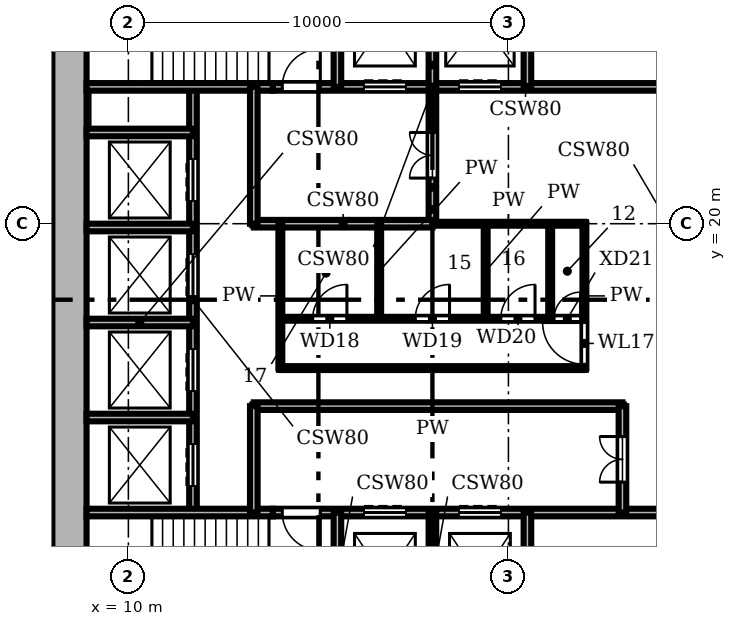
"""IFC4 building model, lengths in metres.
Left out: names, types, materials, properties, quantities, classifications, styles, units other than length and angle.
Written with IfcOpenShell. Run it as: python <this file> out.ifc"""

import sys

from ifc_helpers import new_model, si_unit, direction, frame, frame_2d, origin, place, context, subcontext, project, spatial, rectangle, extrude, element, fill, save


model = new_model("IFC4")
c1 = context("Model", 3, precision=1e-05, world=origin(), true_north=direction((0.0, 1.0)))
c2 = subcontext(c1, "Body", "Model", "MODEL_VIEW")
j1 = project(units=[si_unit("LENGTHUNIT", "METRE"), si_unit("PLANEANGLEUNIT", "RADIAN")], contexts=[c1])
p1 = place(None, origin())
s1 = spatial("IfcSite", under=j1, at=p1, CompositionType="ELEMENT")
p2 = place(p1, origin())
s2 = spatial("IfcBuilding", under=s1, at=p2, CompositionType="ELEMENT")
p3 = place(p2, frame((0.0, 0.0, 12.0)))
s3 = spatial("IfcBuildingStorey", under=s2, at=p3, CompositionType="ELEMENT", Elevation=12.0)
p4 = place(p3, frame((8.45, 27.1, 0.0), z_axis=(0.0, 0.0, 1.0), x_axis=(0.0, -1.0, 0.0)))
e1 = element("IfcWall", 1, at=p4, inside=s3, PredefinedType="SHEAR", context=c2, shape_type="SweptSolid", body=[
    extrude(rectangle(XDim=18.2, YDim=0.9, at=frame_2d((9.1, 0.0))), origin(), (0.0, 0.0, 1.0), 3.9),
])
p5 = place(p3, frame((8.9, 12.4, 0.0), z_axis=(0.0, 0.0, 1.0), x_axis=(1.0, 0.0, 0.0)))
e2 = element("IfcWall", 2, at=p5, inside=s3, PredefinedType="SHEAR", context=c2, shape_type="SweptSolid", body=[
    extrude(rectangle(XDim=4.9, YDim=0.2, at=frame_2d((2.45, 0.0))), origin(), (0.0, 0.0, 1.0), 3.58),
])
p6 = place(p3, frame((13.8, 12.4, 0.0), z_axis=(0.0, 0.0, 1.0), x_axis=(1.0, 0.0, 0.0)))
e3 = element("IfcWall", 3, at=p6, inside=s3, PredefinedType="SHEAR", context=c2, shape_type="SweptSolid", body=[
    extrude(rectangle(XDim=13.3, YDim=0.2, at=frame_2d((6.65, 0.0))), origin(), (0.0, 0.0, 1.0), 3.58),
])
p7 = place(p6, frame((2.4, 0.0, 0.0)))
e4 = element("IfcOpeningElement", 4, at=p7, cuts=e3, PredefinedType="OPENING", context=c2, shape_type="SweptSolid", body=[
    extrude(rectangle(XDim=1.1, YDim=2.1, at=frame_2d((0.55, 1.05))), frame((0.0, 0.11, 0.0), z_axis=(0.0, -1.0, 0.0), x_axis=(1.0, 0.0, 0.0)), (0.0, 0.0, 1.0), 0.22),
])
p8 = place(p6, frame((4.9, 0.0, 0.0)))
e5 = element("IfcOpeningElement", 5, at=p8, cuts=e3, PredefinedType="OPENING", context=c2, shape_type="SweptSolid", body=[
    extrude(rectangle(XDim=1.1, YDim=2.1, at=frame_2d((0.55, 1.05))), frame((0.0, 0.11, 0.0), z_axis=(0.0, -1.0, 0.0), x_axis=(1.0, 0.0, 0.0)), (0.0, 0.0, 1.0), 0.22),
])
p9 = place(p6, frame((0.25, 0.0, 0.0)))
e6 = element("IfcOpeningElement", 6, at=p9, cuts=e3, PredefinedType="OPENING", context=c2, shape_type="SweptSolid", body=[
    extrude(rectangle(XDim=1.0, YDim=2.1, at=frame_2d((0.5, 1.05))), frame((0.0, 0.11, 0.0), z_axis=(0.0, -1.0, 0.0), x_axis=(1.0, 0.0, 0.0)), (0.0, 0.0, 1.0), 0.22),
])
p10 = place(p3, frame((8.9, 14.9, 0.0), z_axis=(0.0, 0.0, 1.0), x_axis=(1.0, 0.0, 0.0)))
e7 = element("IfcWall", 7, at=p10, inside=s3, PredefinedType="SHEAR", context=c2, shape_type="SweptSolid", body=[
    extrude(rectangle(XDim=2.8, YDim=0.2, at=frame_2d((1.4, 0.0))), origin(), (0.0, 0.0, 1.0), 3.58),
])
p11 = place(p3, frame((13.3, 15.2, 0.0), z_axis=(0.0, 0.0, 1.0), x_axis=(1.0, 0.0, 0.0)))
e8 = element("IfcWall", 8, at=p11, inside=s3, PredefinedType="SHEAR", context=c2, shape_type="SweptSolid", body=[
    extrude(rectangle(XDim=9.7, YDim=0.2, at=frame_2d((4.85, 0.0))), origin(), (0.0, 0.0, 1.0), 3.58),
])
p12 = place(p3, frame((14.0, 16.2, 0.0), z_axis=(0.0, 0.0, 1.0), x_axis=(1.0, 0.0, 0.0)))
e9 = element("IfcWall", 9, at=p12, inside=s3, PredefinedType="PARTITIONING", context=c2, shape_type="SweptSolid", body=[
    extrude(rectangle(XDim=8.0, YDim=0.1, at=frame_2d((4.0, 0.0))), origin(), (0.0, 0.0, 1.0), 3.58),
])
p13 = place(p3, frame((8.9, 17.4, 0.0), z_axis=(0.0, 0.0, 1.0), x_axis=(1.0, 0.0, 0.0)))
e10 = element("IfcWall", 10, at=p13, inside=s3, PredefinedType="SHEAR", context=c2, shape_type="SweptSolid", body=[
    extrude(rectangle(XDim=2.8, YDim=0.2, at=frame_2d((1.4, 0.0))), origin(), (0.0, 0.0, 1.0), 3.58),
])
p14 = place(p3, frame((14.0, 17.5, 0.0), z_axis=(0.0, 0.0, 1.0), x_axis=(1.0, 0.0, 0.0)))
e11 = element("IfcWall", 11, at=p14, inside=s3, PredefinedType="PARTITIONING", context=c2, shape_type="SweptSolid", body=[
    extrude(rectangle(XDim=8.0, YDim=0.1, at=frame_2d((4.0, 0.0))), origin(), (0.0, 0.0, 1.0), 3.58),
])
p15 = place(p14, frame((0.85, 0.0, 0.0)))
e12 = element("IfcOpeningElement", 12, at=p15, cuts=e11, PredefinedType="OPENING", context=c2, shape_type="SweptSolid", body=[
    extrude(rectangle(XDim=0.9, YDim=2.1, at=frame_2d((0.45, 1.05))), frame((0.0, 0.06, 0.0), z_axis=(0.0, -1.0, 0.0), x_axis=(1.0, 0.0, 0.0)), (0.0, 0.0, 1.0), 0.12),
])
p16 = place(p14, frame((3.55, 0.0, 0.0)))
e13 = element("IfcOpeningElement", 13, at=p16, cuts=e11, PredefinedType="OPENING", context=c2, shape_type="SweptSolid", body=[
    extrude(rectangle(XDim=0.9, YDim=2.1, at=frame_2d((0.45, 1.05))), frame((0.0, 0.06, 0.0), z_axis=(0.0, -1.0, 0.0), x_axis=(1.0, 0.0, 0.0)), (0.0, 0.0, 1.0), 0.12),
])
p17 = place(p14, frame((5.8, 0.0, 0.0)))
e14 = element("IfcOpeningElement", 14, at=p17, cuts=e11, PredefinedType="OPENING", context=c2, shape_type="SweptSolid", body=[
    extrude(rectangle(XDim=0.9, YDim=2.1, at=frame_2d((0.45, 1.05))), frame((0.0, 0.06, 0.0), z_axis=(0.0, -1.0, 0.0), x_axis=(1.0, 0.0, 0.0)), (0.0, 0.0, 1.0), 0.12),
])
p18 = place(p14, frame((7.2, 0.0, 0.0)))
e15 = element("IfcOpeningElement", 15, at=p18, cuts=e11, PredefinedType="OPENING", context=c2, shape_type="SweptSolid", body=[
    extrude(rectangle(XDim=0.7, YDim=2.1, at=frame_2d((0.35, 1.05))), frame((0.0, 0.06, 0.0), z_axis=(0.0, -1.0, 0.0), x_axis=(1.0, 0.0, 0.0)), (0.0, 0.0, 1.0), 0.12),
])
p19 = place(p3, frame((8.9, 19.9, 0.0), z_axis=(0.0, 0.0, 1.0), x_axis=(1.0, 0.0, 0.0)))
e16 = element("IfcWall", 16, at=p19, inside=s3, PredefinedType="SHEAR", context=c2, shape_type="SweptSolid", body=[
    extrude(rectangle(XDim=2.8, YDim=0.2, at=frame_2d((1.4, 0.0))), origin(), (0.0, 0.0, 1.0), 3.58),
])
p20 = place(p3, frame((18.0, 20.0, 0.0), z_axis=(0.0, 0.0, 1.0), x_axis=(1.0, 0.0, 0.0)))
e17 = element("IfcWall", 17, at=p20, inside=s3, PredefinedType="PARTITIONING", context=c2, shape_type="SweptSolid", body=[
    extrude(rectangle(XDim=4.0, YDim=0.1, at=frame_2d((2.0, 0.0))), origin(), (0.0, 0.0, 1.0), 3.58),
])
p21 = place(p3, frame((13.3, 20.0, 0.0), z_axis=(0.0, 0.0, 1.0), x_axis=(1.0, 0.0, 0.0)))
e18 = element("IfcWall", 18, at=p21, inside=s3, PredefinedType="SHEAR", context=c2, shape_type="SweptSolid", body=[
    extrude(rectangle(XDim=4.7, YDim=0.2, at=frame_2d((2.35, 0.0))), origin(), (0.0, 0.0, 1.0), 3.58),
])
p22 = place(p3, frame((8.9, 22.4, 0.0), z_axis=(0.0, 0.0, 1.0), x_axis=(1.0, 0.0, 0.0)))
e19 = element("IfcWall", 19, at=p22, inside=s3, PredefinedType="SHEAR", context=c2, shape_type="SweptSolid", body=[
    extrude(rectangle(XDim=2.8, YDim=0.2, at=frame_2d((1.4, 0.0))), origin(), (0.0, 0.0, 1.0), 3.58),
])
p23 = place(p3, frame((8.9, 23.6, 0.0), z_axis=(0.0, 0.0, 1.0), x_axis=(1.0, 0.0, 0.0)))
e20 = element("IfcWall", 20, at=p23, inside=s3, PredefinedType="SHEAR", context=c2, shape_type="SweptSolid", body=[
    extrude(rectangle(XDim=4.9, YDim=0.2, at=frame_2d((2.45, 0.0))), origin(), (0.0, 0.0, 1.0), 3.58),
])
p24 = place(p3, frame((13.8, 23.6, 0.0), z_axis=(0.0, 0.0, 1.0), x_axis=(1.0, 0.0, 0.0)))
e21 = element("IfcWall", 21, at=p24, inside=s3, PredefinedType="SHEAR", context=c2, shape_type="SweptSolid", body=[
    extrude(rectangle(XDim=13.3, YDim=0.2, at=frame_2d((6.65, 0.0))), origin(), (0.0, 0.0, 1.0), 3.58),
])
p25 = place(p24, frame((2.4, 0.0, 0.0)))
e22 = element("IfcOpeningElement", 22, at=p25, cuts=e21, PredefinedType="OPENING", context=c2, shape_type="SweptSolid", body=[
    extrude(rectangle(XDim=1.1, YDim=2.1, at=frame_2d((0.55, 1.05))), frame((0.0, 0.11, 0.0), z_axis=(0.0, -1.0, 0.0), x_axis=(1.0, 0.0, 0.0)), (0.0, 0.0, 1.0), 0.22),
])
p26 = place(p24, frame((4.9, 0.0, 0.0)))
e23 = element("IfcOpeningElement", 23, at=p26, cuts=e21, PredefinedType="OPENING", context=c2, shape_type="SweptSolid", body=[
    extrude(rectangle(XDim=1.1, YDim=2.1, at=frame_2d((0.55, 1.05))), frame((0.0, 0.11, 0.0), z_axis=(0.0, -1.0, 0.0), x_axis=(1.0, 0.0, 0.0)), (0.0, 0.0, 1.0), 0.22),
])
p27 = place(p24, frame((0.25, 0.0, 0.0)))
e24 = element("IfcOpeningElement", 24, at=p27, cuts=e21, PredefinedType="OPENING", context=c2, shape_type="SweptSolid", body=[
    extrude(rectangle(XDim=1.0, YDim=2.1, at=frame_2d((0.5, 1.05))), frame((0.0, 0.11, 0.0), z_axis=(0.0, -1.0, 0.0), x_axis=(1.0, 0.0, 0.0)), (0.0, 0.0, 1.0), 0.22),
])
p28 = place(p3, frame((11.7, 12.4, 0.0), z_axis=(0.0, 0.0, 1.0), x_axis=(0.0, 1.0, 0.0)))
e25 = element("IfcWall", 25, at=p28, inside=s3, PredefinedType="SHEAR", context=c2, shape_type="SweptSolid", body=[
    extrude(rectangle(XDim=11.2, YDim=0.2, at=frame_2d((5.6, 0.0))), origin(), (0.0, 0.0, 1.0), 3.58),
])
p29 = place(p28, frame((0.7, 0.0, 0.0)))
e26 = element("IfcOpeningElement", 26, at=p29, cuts=e25, PredefinedType="OPENING", context=c2, shape_type="SweptSolid", body=[
    extrude(rectangle(XDim=1.1, YDim=2.1, at=frame_2d((0.55, 1.05))), frame((0.0, 0.11, 0.0), z_axis=(0.0, -1.0, 0.0), x_axis=(1.0, 0.0, 0.0)), (0.0, 0.0, 1.0), 0.22),
])
p30 = place(p28, frame((3.2, 0.0, 0.0)))
e27 = element("IfcOpeningElement", 27, at=p30, cuts=e25, PredefinedType="OPENING", context=c2, shape_type="SweptSolid", body=[
    extrude(rectangle(XDim=1.1, YDim=2.1, at=frame_2d((0.55, 1.05))), frame((0.0, 0.11, 0.0), z_axis=(0.0, -1.0, 0.0), x_axis=(1.0, 0.0, 0.0)), (0.0, 0.0, 1.0), 0.22),
])
p31 = place(p28, frame((5.7, 0.0, 0.0)))
e28 = element("IfcOpeningElement", 28, at=p31, cuts=e25, PredefinedType="OPENING", context=c2, shape_type="SweptSolid", body=[
    extrude(rectangle(XDim=1.1, YDim=2.1, at=frame_2d((0.55, 1.05))), frame((0.0, 0.11, 0.0), z_axis=(0.0, -1.0, 0.0), x_axis=(1.0, 0.0, 0.0)), (0.0, 0.0, 1.0), 0.22),
])
p32 = place(p28, frame((8.2, 0.0, 0.0)))
e29 = element("IfcOpeningElement", 29, at=p32, cuts=e25, PredefinedType="OPENING", context=c2, shape_type="SweptSolid", body=[
    extrude(rectangle(XDim=1.1, YDim=2.1, at=frame_2d((0.55, 1.05))), frame((0.0, 0.11, 0.0), z_axis=(0.0, -1.0, 0.0), x_axis=(1.0, 0.0, 0.0)), (0.0, 0.0, 1.0), 0.22),
])
p33 = place(p3, frame((13.3, 12.4, 0.0), z_axis=(0.0, 0.0, 1.0), x_axis=(0.0, 1.0, 0.0)))
e30 = element("IfcWall", 30, at=p33, inside=s3, PredefinedType="SHEAR", context=c2, shape_type="SweptSolid", body=[
    extrude(rectangle(XDim=2.8, YDim=0.2, at=frame_2d((1.4, 0.0))), origin(), (0.0, 0.0, 1.0), 3.58),
])
p34 = place(p3, frame((13.3, 20.0, 0.0), z_axis=(0.0, 0.0, 1.0), x_axis=(0.0, 1.0, 0.0)))
e31 = element("IfcWall", 31, at=p34, inside=s3, PredefinedType="SHEAR", context=c2, shape_type="SweptSolid", body=[
    extrude(rectangle(XDim=3.6, YDim=0.2, at=frame_2d((1.8, 0.0))), origin(), (0.0, 0.0, 1.0), 3.58),
])
p35 = place(p3, frame((14.0, 16.2, 0.0), z_axis=(0.0, 0.0, 1.0), x_axis=(0.0, 1.0, 0.0)))
e32 = element("IfcWall", 32, at=p35, inside=s3, PredefinedType="PARTITIONING", context=c2, shape_type="SweptSolid", body=[
    extrude(rectangle(XDim=3.8, YDim=0.1, at=frame_2d((1.9, 0.0))), origin(), (0.0, 0.0, 1.0), 3.58),
])
for number, where, z_axis, x_axis in (
    (33, (15.5, 8.9, 0.0), (0.0, 0.0, 1.0), (0.0, 1.0, 0.0)),
    (34, (15.5, 23.6, 0.0), (0.0, 0.0, 1.0), (0.0, 1.0, 0.0)),
):
    element("IfcWall", number, at=place(p3, frame(where, z_axis=z_axis, x_axis=x_axis)), inside=s3, PredefinedType="SHEAR", context=c2, shape_type="SweptSolid", body=[
        extrude(rectangle(XDim=3.5, YDim=0.2, at=frame_2d((1.75, 0.0))), origin(), (0.0, 0.0, 1.0), 3.58),
    ])
p36 = place(p3, frame((16.6, 17.5, 0.0), z_axis=(0.0, 0.0, 1.0), x_axis=(0.0, 1.0, 0.0)))
e35 = element("IfcWall", 35, at=p36, inside=s3, PredefinedType="PARTITIONING", context=c2, shape_type="SweptSolid", body=[
    extrude(rectangle(XDim=2.5, YDim=0.1, at=frame_2d((1.25, 0.0))), origin(), (0.0, 0.0, 1.0), 3.58),
])
p37 = place(p3, frame((18.0, 8.9, 0.0), z_axis=(0.0, 0.0, 1.0), x_axis=(0.0, 1.0, 0.0)))
e36 = element("IfcWall", 36, at=p37, inside=s3, PredefinedType="SHEAR", context=c2, shape_type="SweptSolid", body=[
    extrude(rectangle(XDim=3.5, YDim=0.2, at=frame_2d((1.75, 0.0))), origin(), (0.0, 0.0, 1.0), 3.58),
])
p38 = place(p3, frame((18.0, 20.0, 0.0), z_axis=(0.0, 0.0, 1.0), x_axis=(0.0, 1.0, 0.0)))
e37 = element("IfcWall", 37, at=p38, inside=s3, PredefinedType="SHEAR", context=c2, shape_type="SweptSolid", body=[
    extrude(rectangle(XDim=7.1, YDim=0.2, at=frame_2d((3.55, 0.0))), origin(), (0.0, 0.0, 1.0), 3.58),
])
p39 = place(p38, frame((1.2, 0.0, 0.0)))
e38 = element("IfcOpeningElement", 38, at=p39, cuts=e37, PredefinedType="OPENING", context=c2, shape_type="SweptSolid", body=[
    extrude(rectangle(XDim=1.2, YDim=2.1, at=frame_2d((0.6, 1.05))), frame((0.0, 0.11, 0.0), z_axis=(0.0, -1.0, 0.0), x_axis=(1.0, 0.0, 0.0)), (0.0, 0.0, 1.0), 0.22),
])
p40 = place(p3, frame((19.4, 17.5, 0.0), z_axis=(0.0, 0.0, 1.0), x_axis=(0.0, 1.0, 0.0)))
e39 = element("IfcWall", 39, at=p40, inside=s3, PredefinedType="PARTITIONING", context=c2, shape_type="SweptSolid", body=[
    extrude(rectangle(XDim=2.5, YDim=0.1, at=frame_2d((1.25, 0.0))), origin(), (0.0, 0.0, 1.0), 3.58),
])
for number, where, z_axis, x_axis in (
    (40, (20.5, 8.9, 0.0), (0.0, 0.0, 1.0), (0.0, 1.0, 0.0)),
    (41, (20.5, 23.6, 0.0), (0.0, 0.0, 1.0), (0.0, 1.0, 0.0)),
):
    element("IfcWall", number, at=place(p3, frame(where, z_axis=z_axis, x_axis=x_axis)), inside=s3, PredefinedType="SHEAR", context=c2, shape_type="SweptSolid", body=[
        extrude(rectangle(XDim=3.5, YDim=0.2, at=frame_2d((1.75, 0.0))), origin(), (0.0, 0.0, 1.0), 3.58),
    ])
p41 = place(p3, frame((21.1, 17.5, 0.0), z_axis=(0.0, 0.0, 1.0), x_axis=(0.0, 1.0, 0.0)))
e42 = element("IfcWall", 42, at=p41, inside=s3, PredefinedType="PARTITIONING", context=c2, shape_type="SweptSolid", body=[
    extrude(rectangle(XDim=2.5, YDim=0.1, at=frame_2d((1.25, 0.0))), origin(), (0.0, 0.0, 1.0), 3.58),
])
p42 = place(p3, frame((22.0, 16.2, 0.0), z_axis=(0.0, 0.0, 1.0), x_axis=(0.0, 1.0, 0.0)))
e43 = element("IfcWall", 43, at=p42, inside=s3, PredefinedType="PARTITIONING", context=c2, shape_type="SweptSolid", body=[
    extrude(rectangle(XDim=3.8, YDim=0.1, at=frame_2d((1.9, 0.0))), origin(), (0.0, 0.0, 1.0), 3.58),
])
p43 = place(p42, frame((0.1, 0.0, 0.0)))
e44 = element("IfcOpeningElement", 44, at=p43, cuts=e43, PredefinedType="OPENING", context=c2, shape_type="SweptSolid", body=[
    extrude(rectangle(XDim=1.1, YDim=2.1, at=frame_2d((0.55, 1.05))), frame((0.0, 0.06, 0.0), z_axis=(0.0, -1.0, 0.0), x_axis=(1.0, 0.0, 0.0)), (0.0, 0.0, 1.0), 0.12),
])
p44 = place(p3, frame((23.0, 12.4, 0.0), z_axis=(0.0, 0.0, 1.0), x_axis=(0.0, 1.0, 0.0)))
e45 = element("IfcWall", 45, at=p44, inside=s3, PredefinedType="SHEAR", context=c2, shape_type="SweptSolid", body=[
    extrude(rectangle(XDim=2.8, YDim=0.2, at=frame_2d((1.4, 0.0))), origin(), (0.0, 0.0, 1.0), 3.58),
])
p45 = place(p44, frame((0.8, 0.0, 0.0)))
e46 = element("IfcOpeningElement", 46, at=p45, cuts=e45, PredefinedType="OPENING", context=c2, shape_type="SweptSolid", body=[
    extrude(rectangle(XDim=1.2, YDim=2.1, at=frame_2d((0.6, 1.05))), frame((0.0, 0.11, 0.0), z_axis=(0.0, -1.0, 0.0), x_axis=(1.0, 0.0, 0.0)), (0.0, 0.0, 1.0), 0.22),
])
p46 = place(p29, origin())
e47 = element("IfcDoor", 47, at=p46, inside=s3, OperationType="DOUBLE_DOOR_SLIDING", PredefinedType="DOOR", context=c2, shape_type="SweptSolid", body=[
    extrude(rectangle(XDim=1.1, YDim=2.1, at=frame_2d((0.55, 1.05))), frame((0.0, 0.025, 0.0), z_axis=(0.0, -1.0, 0.0), x_axis=(1.0, 0.0, 0.0)), (0.0, 0.0, 1.0), 0.05),
])
fill(e26, e47)
p47 = place(p30, origin())
e48 = element("IfcDoor", 48, at=p47, inside=s3, OperationType="DOUBLE_DOOR_SLIDING", PredefinedType="DOOR", context=c2, shape_type="SweptSolid", body=[
    extrude(rectangle(XDim=1.1, YDim=2.1, at=frame_2d((0.55, 1.05))), frame((0.0, 0.025, 0.0), z_axis=(0.0, -1.0, 0.0), x_axis=(1.0, 0.0, 0.0)), (0.0, 0.0, 1.0), 0.05),
])
fill(e27, e48)
p48 = place(p31, origin())
e49 = element("IfcDoor", 49, at=p48, inside=s3, OperationType="DOUBLE_DOOR_SLIDING", PredefinedType="DOOR", context=c2, shape_type="SweptSolid", body=[
    extrude(rectangle(XDim=1.1, YDim=2.1, at=frame_2d((0.55, 1.05))), frame((0.0, 0.025, 0.0), z_axis=(0.0, -1.0, 0.0), x_axis=(1.0, 0.0, 0.0)), (0.0, 0.0, 1.0), 0.05),
])
fill(e28, e49)
p49 = place(p32, origin())
e50 = element("IfcDoor", 50, at=p49, inside=s3, OperationType="DOUBLE_DOOR_SLIDING", PredefinedType="DOOR", context=c2, shape_type="SweptSolid", body=[
    extrude(rectangle(XDim=1.1, YDim=2.1, at=frame_2d((0.55, 1.05))), frame((0.0, 0.025, 0.0), z_axis=(0.0, -1.0, 0.0), x_axis=(1.0, 0.0, 0.0)), (0.0, 0.0, 1.0), 0.05),
])
fill(e29, e50)
p50 = place(p7, origin())
e51 = element("IfcDoor", 51, at=p50, inside=s3, OperationType="DOUBLE_DOOR_SLIDING", PredefinedType="DOOR", context=c2, shape_type="SweptSolid", body=[
    extrude(rectangle(XDim=1.1, YDim=2.1, at=frame_2d((0.55, 1.05))), frame((0.0, 0.025, 0.0), z_axis=(0.0, -1.0, 0.0), x_axis=(1.0, 0.0, 0.0)), (0.0, 0.0, 1.0), 0.05),
])
fill(e4, e51)
p51 = place(p8, origin())
e52 = element("IfcDoor", 52, at=p51, inside=s3, OperationType="DOUBLE_DOOR_SLIDING", PredefinedType="DOOR", context=c2, shape_type="SweptSolid", body=[
    extrude(rectangle(XDim=1.1, YDim=2.1, at=frame_2d((0.55, 1.05))), frame((0.0, 0.025, 0.0), z_axis=(0.0, -1.0, 0.0), x_axis=(1.0, 0.0, 0.0)), (0.0, 0.0, 1.0), 0.05),
])
fill(e5, e52)
p52 = place(p25, origin())
e53 = element("IfcDoor", 53, at=p52, inside=s3, OperationType="DOUBLE_DOOR_SLIDING", PredefinedType="DOOR", context=c2, shape_type="SweptSolid", body=[
    extrude(rectangle(XDim=1.1, YDim=2.1, at=frame_2d((0.55, 1.05))), frame((0.0, 0.025, 0.0), z_axis=(0.0, -1.0, 0.0), x_axis=(1.0, 0.0, 0.0)), (0.0, 0.0, 1.0), 0.05),
])
fill(e22, e53)
p53 = place(p26, origin())
e54 = element("IfcDoor", 54, at=p53, inside=s3, OperationType="DOUBLE_DOOR_SLIDING", PredefinedType="DOOR", context=c2, shape_type="SweptSolid", body=[
    extrude(rectangle(XDim=1.1, YDim=2.1, at=frame_2d((0.55, 1.05))), frame((0.0, 0.025, 0.0), z_axis=(0.0, -1.0, 0.0), x_axis=(1.0, 0.0, 0.0)), (0.0, 0.0, 1.0), 0.05),
])
fill(e23, e54)
p54 = place(p9, frame((1.0, 0.0, 0.0), z_axis=(0.0, 0.0, 1.0), x_axis=(-1.0, 0.0, 0.0)))
e55 = element("IfcDoor", 55, at=p54, inside=s3, OperationType="SINGLE_SWING_LEFT", PredefinedType="DOOR", context=c2, shape_type="SweptSolid", body=[
    extrude(rectangle(XDim=1.0, YDim=2.1, at=frame_2d((0.5, 1.05))), frame((0.0, 0.025, 0.0), z_axis=(0.0, -1.0, 0.0), x_axis=(1.0, 0.0, 0.0)), (0.0, 0.0, 1.0), 0.05),
])
fill(e6, e55)
p55 = place(p27, origin())
e56 = element("IfcDoor", 56, at=p55, inside=s3, OperationType="SINGLE_SWING_RIGHT", PredefinedType="DOOR", context=c2, shape_type="SweptSolid", body=[
    extrude(rectangle(XDim=1.0, YDim=2.1, at=frame_2d((0.5, 1.05))), frame((0.0, 0.025, 0.0), z_axis=(0.0, -1.0, 0.0), x_axis=(1.0, 0.0, 0.0)), (0.0, 0.0, 1.0), 0.05),
])
fill(e24, e56)
p56 = place(p45, origin())
e57 = element("IfcDoor", 57, at=p56, inside=s3, OperationType="DOUBLE_DOOR_SINGLE_SWING", PredefinedType="DOOR", context=c2, shape_type="SweptSolid", body=[
    extrude(rectangle(XDim=1.2, YDim=2.1, at=frame_2d((0.6, 1.05))), frame((0.0, 0.025, 0.0), z_axis=(0.0, -1.0, 0.0), x_axis=(1.0, 0.0, 0.0)), (0.0, 0.0, 1.0), 0.05),
])
fill(e46, e57)
p57 = place(p39, origin())
e58 = element("IfcDoor", 58, at=p57, inside=s3, OperationType="DOUBLE_DOOR_SINGLE_SWING", PredefinedType="DOOR", context=c2, shape_type="SweptSolid", body=[
    extrude(rectangle(XDim=1.2, YDim=2.1, at=frame_2d((0.6, 1.05))), frame((0.0, 0.025, 0.0), z_axis=(0.0, -1.0, 0.0), x_axis=(1.0, 0.0, 0.0)), (0.0, 0.0, 1.0), 0.05),
])
fill(e38, e58)
p58 = place(p43, origin())
e59 = element("IfcDoor", 59, at=p58, inside=s3, OperationType="SINGLE_SWING_RIGHT", PredefinedType="DOOR", context=c2, shape_type="SweptSolid", body=[
    extrude(rectangle(XDim=1.1, YDim=2.1, at=frame_2d((0.55, 1.05))), frame((0.0, 0.025, 0.0), z_axis=(0.0, -1.0, 0.0), x_axis=(1.0, 0.0, 0.0)), (0.0, 0.0, 1.0), 0.05),
])
fill(e44, e59)
p59 = place(p15, origin())
e60 = element("IfcDoor", 60, at=p59, inside=s3, OperationType="SINGLE_SWING_RIGHT", PredefinedType="DOOR", context=c2, shape_type="SweptSolid", body=[
    extrude(rectangle(XDim=0.9, YDim=2.1, at=frame_2d((0.45, 1.05))), frame((0.0, 0.025, 0.0), z_axis=(0.0, -1.0, 0.0), x_axis=(1.0, 0.0, 0.0)), (0.0, 0.0, 1.0), 0.05),
])
fill(e12, e60)
p60 = place(p16, origin())
e61 = element("IfcDoor", 61, at=p60, inside=s3, OperationType="SINGLE_SWING_RIGHT", PredefinedType="DOOR", context=c2, shape_type="SweptSolid", body=[
    extrude(rectangle(XDim=0.9, YDim=2.1, at=frame_2d((0.45, 1.05))), frame((0.0, 0.025, 0.0), z_axis=(0.0, -1.0, 0.0), x_axis=(1.0, 0.0, 0.0)), (0.0, 0.0, 1.0), 0.05),
])
fill(e13, e61)
p61 = place(p17, origin())
e62 = element("IfcDoor", 62, at=p61, inside=s3, OperationType="SINGLE_SWING_RIGHT", PredefinedType="DOOR", context=c2, shape_type="SweptSolid", body=[
    extrude(rectangle(XDim=0.9, YDim=2.1, at=frame_2d((0.45, 1.05))), frame((0.0, 0.025, 0.0), z_axis=(0.0, -1.0, 0.0), x_axis=(1.0, 0.0, 0.0)), (0.0, 0.0, 1.0), 0.05),
])
fill(e14, e62)
p62 = place(p18, origin())
e63 = element("IfcDoor", 63, at=p62, inside=s3, OperationType="SINGLE_SWING_RIGHT", PredefinedType="DOOR", context=c2, shape_type="SweptSolid", body=[
    extrude(rectangle(XDim=0.7, YDim=2.1, at=frame_2d((0.35, 1.05))), frame((0.0, 0.025, 0.0), z_axis=(0.0, -1.0, 0.0), x_axis=(1.0, 0.0, 0.0)), (0.0, 0.0, 1.0), 0.05),
])
fill(e15, e63)
save(model, sys.argv[1])
